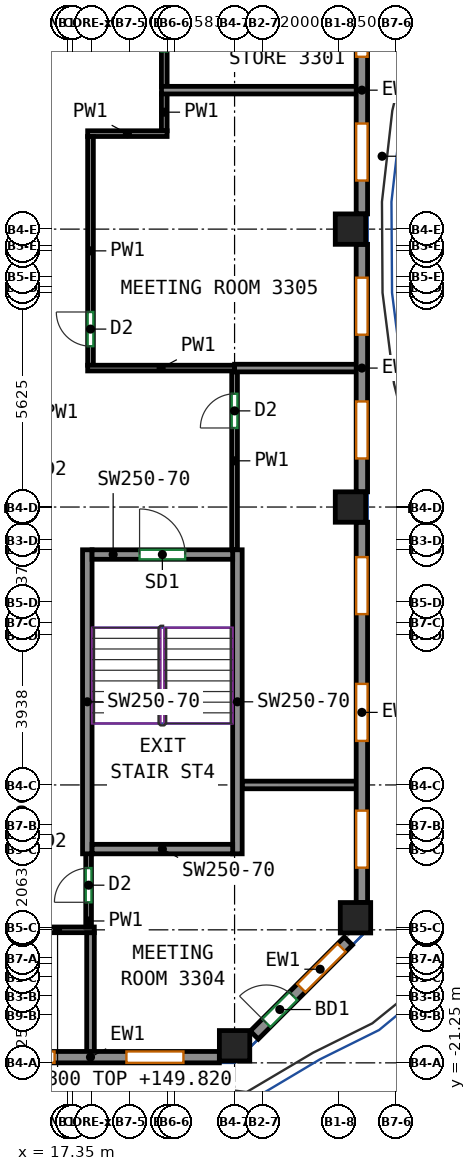
"""IFC4 building model, lengths in metres.
Left out: names, types, materials, properties, quantities, classifications, styles, units other than length and angle.
Written with IfcOpenShell. Run it as: python <this file> out.ifc"""

import sys

from ifc_helpers import new_model, si_unit, direction, frame, frame_2d, origin, origin_2d, place, context, subcontext, project, spatial, rectangle, extrude, source, transform, mapped, element, fill, save


model = new_model("IFC4")
c1 = context("Model", 3, precision=1e-05, world=origin(), true_north=direction((0.0, 1.0)))
c2 = subcontext(c1, "Body", "Model", "MODEL_VIEW")
j1 = project(units=[si_unit("LENGTHUNIT", "METRE"), si_unit("PLANEANGLEUNIT", "RADIAN")], contexts=[c1])
p1 = place(None, origin())
s1 = spatial("IfcSite", under=j1, at=p1, CompositionType="ELEMENT")
p2 = place(p1, origin())
s2 = spatial("IfcBuilding", under=s1, at=p2, CompositionType="ELEMENT")
p3 = place(p2, frame((0.0, 0.0, 147.3)))
s3 = spatial("IfcBuildingStorey", under=s2, at=p3, CompositionType="ELEMENT", Elevation=147.3)
m1 = source(origin(), c2, "Body", "SweptSolid", [
    extrude(rectangle(XDim=0.8, YDim=0.8, at=origin_2d()), origin(), (0.0, 0.0, 1.0), 3.12),
])
for number, where, z_axis, x_axis in (
    (1, (21.75, -20.8, 0.0), (0.0, 0.0, 1.0), (1.0, 0.0, 0.0)),
    (2, (24.8, -6.625, 0.0), (0.0, 0.0, 1.0), (1.0, 0.0, 0.0)),
    (3, (24.8, 0.688, 0.0), (0.0, 0.0, 1.0), (1.0, 0.0, 0.0)),
    (4, (24.932, -17.432, 0.0), (0.0, 0.0, 1.0), (1.0, 0.0, 0.0)),
):
    element("IfcColumn", number, at=place(p3, frame(where, z_axis=z_axis, x_axis=x_axis)), inside=s3, PredefinedType="COLUMN", context=c2, shape_type="MappedRepresentation", body=[
        mapped(m1, transform((0.0, 0.0, 0.0))),
    ])
m2 = source(origin(), c2, "Body", "SweptSolid", [
    extrude(rectangle(XDim=8.0, YDim=0.25, at=frame_2d((4.0, 0.0))), origin(), (0.0, 0.0, 1.0), 3.12),
])
for number, where, z_axis, x_axis in (
    (5, (17.875, -15.75, 0.0), (0.0, 0.0, 1.0), (0.0, 1.0, 0.0)),
    (6, (21.825, -15.75, 0.0), (0.0, 0.0, 1.0), (0.0, 1.0, 0.0)),
):
    element("IfcWall", number, at=place(p3, frame(where, z_axis=z_axis, x_axis=x_axis)), inside=s3, PredefinedType="SHEAR", context=c2, shape_type="MappedRepresentation", body=[
        mapped(m2, transform((0.0, 0.0, 0.0))),
    ])
m3 = source(origin(), c2, "Body", "SweptSolid", [
    extrude(rectangle(XDim=3.7, YDim=0.25, at=frame_2d((1.85, 0.0))), origin(), (0.0, 0.0, 1.0), 3.12),
])
p4 = place(p3, frame((18.0, -15.625, 0.0), z_axis=(0.0, 0.0, 1.0), x_axis=(1.0, 0.0, 0.0)))
e7 = element("IfcWall", 7, at=p4, inside=s3, PredefinedType="SHEAR", context=c2, shape_type="MappedRepresentation", body=[
    mapped(m3, transform((0.0, 0.0, 0.0))),
])
p5 = place(p3, frame((18.0, -7.875, 0.0), z_axis=(0.0, 0.0, 1.0), x_axis=(1.0, 0.0, 0.0)))
e8 = element("IfcWall", 8, at=p5, inside=s3, PredefinedType="SHEAR", context=c2, shape_type="MappedRepresentation", body=[
    mapped(m3, transform((0.0, 0.0, 0.0))),
])
p6 = place(p5, frame((1.25, 0.0, 0.0)))
e9 = element("IfcOpeningElement", 9, at=p6, cuts=e8, PredefinedType="OPENING", context=c2, shape_type="SweptSolid", body=[
    extrude(rectangle(XDim=1.2, YDim=2.1, at=frame_2d((0.6, 1.05))), frame((0.0, 0.135, 0.0), z_axis=(0.0, -1.0, 0.0), x_axis=(1.0, 0.0, 0.0)), (0.0, 0.0, 1.0), 0.27),
])
m4 = source(origin(), c2, "Body", "SweptSolid", [
    extrude(rectangle(XDim=6.783, YDim=0.3, at=frame_2d((3.392, 0.0))), origin(), (0.0, 0.0, 1.0), 3.12),
])
p7 = place(p3, frame((14.567, -21.1, 0.0), z_axis=(0.0, 0.0, 1.0), x_axis=(1.0, 0.0, 0.0)))
e10 = element("IfcWall", 10, at=p7, inside=s3, PredefinedType="SOLIDWALL", context=c2, shape_type="MappedRepresentation", body=[
    mapped(m4, transform((0.0, 0.0, 0.0))),
])
p8 = place(p7, frame((0.946, 0.0, 0.85)))
e11 = element("IfcOpeningElement", 11, at=p8, cuts=e10, PredefinedType="OPENING", context=c2, shape_type="SweptSolid", body=[
    extrude(rectangle(XDim=1.5, YDim=1.95, at=frame_2d((0.75, 0.975))), frame((0.0, 0.16, 0.0), z_axis=(0.0, -1.0, 0.0), x_axis=(1.0, 0.0, 0.0)), (0.0, 0.0, 1.0), 0.32),
])
p9 = place(p7, frame((4.337, 0.0, 0.85)))
e12 = element("IfcOpeningElement", 12, at=p9, cuts=e10, PredefinedType="OPENING", context=c2, shape_type="SweptSolid", body=[
    extrude(rectangle(XDim=1.5, YDim=1.95, at=frame_2d((0.75, 0.975))), frame((0.0, 0.16, 0.0), z_axis=(0.0, -1.0, 0.0), x_axis=(1.0, 0.0, 0.0)), (0.0, 0.0, 1.0), 0.32),
])
m5 = source(origin(), c2, "Body", "SweptSolid", [
    extrude(rectangle(XDim=3.5, YDim=0.3, at=frame_2d((1.75, 0.0))), origin(), (0.0, 0.0, 1.0), 3.12),
])
p10 = place(p3, frame((22.269, -20.519, 0.0), z_axis=(0.0, 0.0, 1.0), x_axis=(0.707141656123, 0.70707190453, 0.0)))
e13 = element("IfcWall", 13, at=p10, inside=s3, PredefinedType="SOLIDWALL", context=c2, shape_type="MappedRepresentation", body=[
    mapped(m5, transform((0.0, 0.0, 0.0))),
])
p11 = place(p10, frame((1.75, 0.0, 0.85)))
e14 = element("IfcOpeningElement", 14, at=p11, cuts=e13, PredefinedType="OPENING", context=c2, shape_type="SweptSolid", body=[
    extrude(rectangle(XDim=1.5, YDim=1.95, at=frame_2d((0.75, 0.975))), frame((0.0, 0.16, 0.0), z_axis=(0.0, -1.0, 0.0), x_axis=(1.0, 0.0, 0.0)), (0.0, 0.0, 1.0), 0.32),
])
p12 = place(p10, frame((0.45, 0.0, 0.0)))
e15 = element("IfcOpeningElement", 15, at=p12, cuts=e13, PredefinedType="OPENING", context=c2, shape_type="SweptSolid", body=[
    extrude(rectangle(XDim=1.0, YDim=2.1, at=frame_2d((0.5, 1.05))), frame((0.0, 0.16, 0.0), z_axis=(0.0, -1.0, 0.0), x_axis=(1.0, 0.0, 0.0)), (0.0, 0.0, 1.0), 0.32),
])
m6 = source(origin(), c2, "Body", "SweptSolid", [
    extrude(rectangle(XDim=10.007, YDim=0.3, at=frame_2d((5.003, 0.0))), origin(), (0.0, 0.0, 1.0), 3.12),
])
p13 = place(p3, frame((25.1, -17.032, 0.0), z_axis=(0.0, 0.0, 1.0), x_axis=(0.0, 1.0, 0.0)))
e16 = element("IfcWall", 16, at=p13, inside=s3, PredefinedType="SOLIDWALL", context=c2, shape_type="MappedRepresentation", body=[
    mapped(m6, transform((0.0, 0.0, 0.0))),
])
p14 = place(p13, frame((0.918, 0.0, 0.85)))
e17 = element("IfcOpeningElement", 17, at=p14, cuts=e16, PredefinedType="OPENING", context=c2, shape_type="SweptSolid", body=[
    extrude(rectangle(XDim=1.5, YDim=1.95, at=frame_2d((0.75, 0.975))), frame((0.0, 0.16, 0.0), z_axis=(0.0, -1.0, 0.0), x_axis=(1.0, 0.0, 0.0)), (0.0, 0.0, 1.0), 0.32),
])
p15 = place(p13, frame((4.253, 0.0, 0.85)))
e18 = element("IfcOpeningElement", 18, at=p15, cuts=e16, PredefinedType="OPENING", context=c2, shape_type="SweptSolid", body=[
    extrude(rectangle(XDim=1.5, YDim=1.95, at=frame_2d((0.75, 0.975))), frame((0.0, 0.16, 0.0), z_axis=(0.0, -1.0, 0.0), x_axis=(1.0, 0.0, 0.0)), (0.0, 0.0, 1.0), 0.32),
])
p16 = place(p13, frame((7.589, 0.0, 0.85)))
e19 = element("IfcOpeningElement", 19, at=p16, cuts=e16, PredefinedType="OPENING", context=c2, shape_type="SweptSolid", body=[
    extrude(rectangle(XDim=1.5, YDim=1.95, at=frame_2d((0.75, 0.975))), frame((0.0, 0.16, 0.0), z_axis=(0.0, -1.0, 0.0), x_axis=(1.0, 0.0, 0.0)), (0.0, 0.0, 1.0), 0.32),
])
m7 = source(origin(), c2, "Body", "SweptSolid", [
    extrude(rectangle(XDim=6.513, YDim=0.3, at=frame_2d((3.256, 0.0))), origin(), (0.0, 0.0, 1.0), 3.12),
])
p17 = place(p3, frame((25.1, -6.225, 0.0), z_axis=(0.0, 0.0, 1.0), x_axis=(0.0, 1.0, 0.0)))
e20 = element("IfcWall", 20, at=p17, inside=s3, PredefinedType="SOLIDWALL", context=c2, shape_type="MappedRepresentation", body=[
    mapped(m7, transform((0.0, 0.0, 0.0))),
])
p18 = place(p17, frame((0.878, 0.0, 0.85)))
e21 = element("IfcOpeningElement", 21, at=p18, cuts=e20, PredefinedType="OPENING", context=c2, shape_type="SweptSolid", body=[
    extrude(rectangle(XDim=1.5, YDim=1.95, at=frame_2d((0.75, 0.975))), frame((0.0, 0.16, 0.0), z_axis=(0.0, -1.0, 0.0), x_axis=(1.0, 0.0, 0.0)), (0.0, 0.0, 1.0), 0.32),
])
p19 = place(p17, frame((4.135, 0.0, 0.85)))
e22 = element("IfcOpeningElement", 22, at=p19, cuts=e20, PredefinedType="OPENING", context=c2, shape_type="SweptSolid", body=[
    extrude(rectangle(XDim=1.5, YDim=1.95, at=frame_2d((0.75, 0.975))), frame((0.0, 0.16, 0.0), z_axis=(0.0, -1.0, 0.0), x_axis=(1.0, 0.0, 0.0)), (0.0, 0.0, 1.0), 0.32),
])
p20 = place(p3, frame((25.1, 1.087, 0.0), z_axis=(0.0, 0.0, 1.0), x_axis=(0.0, 1.0, 0.0)))
e23 = element("IfcWall", 23, at=p20, inside=s3, PredefinedType="SOLIDWALL", context=c2, shape_type="MappedRepresentation", body=[
    mapped(m7, transform((0.0, 0.0, 0.0))),
])
p21 = place(p20, frame((0.878, 0.0, 0.85)))
e24 = element("IfcOpeningElement", 24, at=p21, cuts=e23, PredefinedType="OPENING", context=c2, shape_type="SweptSolid", body=[
    extrude(rectangle(XDim=1.5, YDim=1.95, at=frame_2d((0.75, 0.975))), frame((0.0, 0.16, 0.0), z_axis=(0.0, -1.0, 0.0), x_axis=(1.0, 0.0, 0.0)), (0.0, 0.0, 1.0), 0.32),
])
p22 = place(p20, frame((4.135, 0.0, 0.85)))
e25 = element("IfcOpeningElement", 25, at=p22, cuts=e23, PredefinedType="OPENING", context=c2, shape_type="SweptSolid", body=[
    extrude(rectangle(XDim=1.5, YDim=1.95, at=frame_2d((0.75, 0.975))), frame((0.0, 0.16, 0.0), z_axis=(0.0, -1.0, 0.0), x_axis=(1.0, 0.0, 0.0)), (0.0, 0.0, 1.0), 0.32),
])
p23 = place(p3, frame((16.125, -17.75, 0.0), z_axis=(0.0, 0.0, 1.0), x_axis=(1.0, 0.0, 0.0)))
e26 = element("IfcWall", 26, at=p23, inside=s3, PredefinedType="PARTITIONING", context=c2, shape_type="SweptSolid", body=[
    extrude(rectangle(XDim=1.934, YDim=0.15, at=frame_2d((0.967, 0.0))), origin(), (0.0, 0.0, 1.0), 2.52),
])
p24 = place(p3, frame((17.909, -17.675, 0.0), z_axis=(0.0, 0.0, 1.0), x_axis=(0.0, 1.0, 0.0)))
e27 = element("IfcWall", 27, at=p24, inside=s3, PredefinedType="PARTITIONING", context=c2, shape_type="SweptSolid", body=[
    extrude(rectangle(XDim=1.975, YDim=0.15, at=frame_2d((0.988, 0.0))), origin(), (0.0, 0.0, 1.0), 3.12),
])
p25 = place(p24, frame((0.65, 0.0, 0.0)))
e28 = element("IfcOpeningElement", 28, at=p25, cuts=e27, PredefinedType="OPENING", context=c2, shape_type="SweptSolid", body=[
    extrude(rectangle(XDim=0.9, YDim=2.1, at=frame_2d((0.45, 1.05))), frame((0.0, 0.085, 0.0), z_axis=(0.0, -1.0, 0.0), x_axis=(1.0, 0.0, 0.0)), (0.0, 0.0, 1.0), 0.17),
])
p26 = place(p3, frame((19.9, 4.434, 0.0), z_axis=(0.0, 0.0, 1.0), x_axis=(0.0, 1.0, 0.0)))
e29 = element("IfcWall", 29, at=p26, inside=s3, PredefinedType="PARTITIONING", context=c2, shape_type="SweptSolid", body=[
    extrude(rectangle(XDim=3.476, YDim=0.15, at=frame_2d((1.738, 0.0))), origin(), (0.0, 0.0, 1.0), 3.12),
])
p27 = place(p26, frame((0.927, 0.0, 0.0)))
e30 = element("IfcOpeningElement", 30, at=p27, cuts=e29, PredefinedType="OPENING", context=c2, shape_type="SweptSolid", body=[
    extrude(rectangle(XDim=1.0, YDim=2.1, at=frame_2d((0.5, 1.05))), frame((0.0, 0.085, 0.0), z_axis=(0.0, -1.0, 0.0), x_axis=(1.0, 0.0, 0.0)), (0.0, 0.0, 1.0), 0.17),
])
p28 = place(p3, frame((19.9, 3.275, 0.0), z_axis=(0.0, 0.0, 1.0), x_axis=(0.0, 1.0, 0.0)))
e31 = element("IfcWall", 31, at=p28, inside=s3, PredefinedType="PARTITIONING", context=c2, shape_type="SweptSolid", body=[
    extrude(rectangle(XDim=0.979, YDim=0.15, at=frame_2d((0.49, 0.0))), origin(), (0.0, 0.0, 1.0), 3.12),
])
p29 = place(p3, frame((17.884, 3.2, 0.0), z_axis=(0.0, 0.0, 1.0), x_axis=(1.0, 0.0, 0.0)))
e32 = element("IfcWall", 32, at=p29, inside=s3, PredefinedType="PARTITIONING", context=c2, shape_type="SweptSolid", body=[
    extrude(rectangle(XDim=2.091, YDim=0.15, at=frame_2d((1.045, 0.0))), origin(), (0.0, 0.0, 1.0), 3.12),
])
p30 = place(p3, frame((17.959, -2.894, 0.0), z_axis=(0.0, 0.0, 1.0), x_axis=(0.0, 1.0, 0.0)))
e33 = element("IfcWall", 33, at=p30, inside=s3, PredefinedType="PARTITIONING", context=c2, shape_type="SweptSolid", body=[
    extrude(rectangle(XDim=6.019, YDim=0.15, at=frame_2d((3.01, 0.0))), origin(), (0.0, 0.0, 1.0), 3.12),
])
p31 = place(p30, frame((0.501, 0.0, 0.0)))
e34 = element("IfcOpeningElement", 34, at=p31, cuts=e33, PredefinedType="OPENING", context=c2, shape_type="SweptSolid", body=[
    extrude(rectangle(XDim=0.9, YDim=2.1, at=frame_2d((0.45, 1.05))), frame((0.0, 0.085, 0.0), z_axis=(0.0, -1.0, 0.0), x_axis=(1.0, 0.0, 0.0)), (0.0, 0.0, 1.0), 0.17),
])
p32 = place(p3, frame((21.751, -2.969, 0.0), z_axis=(0.0, 0.0, 1.0), x_axis=(-1.0, 0.0, 0.0)))
e35 = element("IfcWall", 35, at=p32, inside=s3, PredefinedType="PARTITIONING", context=c2, shape_type="SweptSolid", body=[
    extrude(rectangle(XDim=3.867, YDim=0.15, at=frame_2d((1.934, 0.0))), origin(), (0.0, 0.0, 1.0), 3.12),
])
p33 = place(p3, frame((21.75, -7.75, 0.0), z_axis=(0.0, 0.0, 1.0), x_axis=(0.0, 1.0, 0.0)))
e36 = element("IfcWall", 36, at=p33, inside=s3, PredefinedType="PARTITIONING", context=c2, shape_type="SweptSolid", body=[
    extrude(rectangle(XDim=4.682, YDim=0.15, at=frame_2d((2.341, 0.0))), origin(), (0.0, 0.0, 1.0), 3.12),
])
p34 = place(p33, frame((3.205, 0.0, 0.0)))
e37 = element("IfcOpeningElement", 37, at=p34, cuts=e36, PredefinedType="OPENING", context=c2, shape_type="SweptSolid", body=[
    extrude(rectangle(XDim=0.9, YDim=2.1, at=frame_2d((0.45, 1.05))), frame((0.0, 0.085, 0.0), z_axis=(0.0, -1.0, 0.0), x_axis=(1.0, 0.0, 0.0)), (0.0, 0.0, 1.0), 0.17),
])
p35 = place(p3, frame((17.959, -21.0, 0.0), z_axis=(0.0, 0.0, 1.0), x_axis=(0.0, 1.0, 0.0)))
e38 = element("IfcWall", 38, at=p35, inside=s3, PredefinedType="PARTITIONING", context=c2, shape_type="SweptSolid", body=[
    extrude(rectangle(XDim=3.173, YDim=0.2, at=frame_2d((1.586, 0.0))), origin(), (0.0, 0.0, 1.0), 3.12),
])
p36 = place(p3, frame((25.0, -13.938, 0.0), z_axis=(0.0, 0.0, 1.0), x_axis=(-1.0, 0.0, 0.0)))
e39 = element("IfcWall", 39, at=p36, inside=s3, PredefinedType="PARTITIONING", context=c2, shape_type="SweptSolid", body=[
    extrude(rectangle(XDim=3.05, YDim=0.2, at=frame_2d((1.525, 0.0))), origin(), (0.0, 0.0, 1.0), 3.12),
])
p37 = place(p3, frame((19.827, 4.344, 0.0), z_axis=(0.0, 0.0, 1.0), x_axis=(1.0, 0.0, 0.0)))
e40 = element("IfcWall", 40, at=p37, inside=s3, PredefinedType="PARTITIONING", context=c2, shape_type="SweptSolid", body=[
    extrude(rectangle(XDim=5.173, YDim=0.2, at=frame_2d((2.586, 0.0))), origin(), (0.0, 0.0, 1.0), 3.12),
])
p38 = place(p3, frame((21.751, -2.968, 0.0), z_axis=(0.0, 0.0, 1.0), x_axis=(0.999999954829, -0.000300571071, 0.0)))
e41 = element("IfcWall", 41, at=p38, inside=s3, PredefinedType="PARTITIONING", context=c2, shape_type="SweptSolid", body=[
    extrude(rectangle(XDim=3.249, YDim=0.2, at=frame_2d((1.625, 0.0))), origin(), (0.0, 0.0, 1.0), 3.12),
])
p39 = place(p8, origin())
e42 = element("IfcWindow", 42, at=p39, inside=s3, PartitioningType="SINGLE_PANEL", PredefinedType="WINDOW", context=c2, shape_type="SweptSolid", body=[
    extrude(rectangle(XDim=1.5, YDim=1.95, at=frame_2d((0.75, 0.975))), frame((0.0, 0.03, 0.0), z_axis=(0.0, -1.0, 0.0), x_axis=(1.0, 0.0, 0.0)), (0.0, 0.0, 1.0), 0.06),
])
fill(e11, e42)
p40 = place(p9, origin())
e43 = element("IfcWindow", 43, at=p40, inside=s3, PartitioningType="SINGLE_PANEL", PredefinedType="WINDOW", context=c2, shape_type="SweptSolid", body=[
    extrude(rectangle(XDim=1.5, YDim=1.95, at=frame_2d((0.75, 0.975))), frame((0.0, 0.03, 0.0), z_axis=(0.0, -1.0, 0.0), x_axis=(1.0, 0.0, 0.0)), (0.0, 0.0, 1.0), 0.06),
])
fill(e12, e43)
p41 = place(p11, origin())
e44 = element("IfcWindow", 44, at=p41, inside=s3, PartitioningType="SINGLE_PANEL", PredefinedType="WINDOW", context=c2, shape_type="SweptSolid", body=[
    extrude(rectangle(XDim=1.5, YDim=1.95, at=frame_2d((0.75, 0.975))), frame((0.0, 0.03, 0.0), z_axis=(0.0, -1.0, 0.0), x_axis=(1.0, 0.0, 0.0)), (0.0, 0.0, 1.0), 0.06),
])
fill(e14, e44)
p42 = place(p12, origin())
e45 = element("IfcDoor", 45, at=p42, inside=s3, OperationType="SINGLE_SWING_LEFT", PredefinedType="DOOR", context=c2, shape_type="SweptSolid", body=[
    extrude(rectangle(XDim=1.0, YDim=2.1, at=frame_2d((0.5, 1.05))), frame((0.0, 0.025, 0.0), z_axis=(0.0, -1.0, 0.0), x_axis=(1.0, 0.0, 0.0)), (0.0, 0.0, 1.0), 0.05),
])
fill(e15, e45)
p43 = place(p14, origin())
e46 = element("IfcWindow", 46, at=p43, inside=s3, PartitioningType="SINGLE_PANEL", PredefinedType="WINDOW", context=c2, shape_type="SweptSolid", body=[
    extrude(rectangle(XDim=1.5, YDim=1.95, at=frame_2d((0.75, 0.975))), frame((0.0, 0.03, 0.0), z_axis=(0.0, -1.0, 0.0), x_axis=(1.0, 0.0, 0.0)), (0.0, 0.0, 1.0), 0.06),
])
fill(e17, e46)
p44 = place(p15, origin())
e47 = element("IfcWindow", 47, at=p44, inside=s3, PartitioningType="SINGLE_PANEL", PredefinedType="WINDOW", context=c2, shape_type="SweptSolid", body=[
    extrude(rectangle(XDim=1.5, YDim=1.95, at=frame_2d((0.75, 0.975))), frame((0.0, 0.03, 0.0), z_axis=(0.0, -1.0, 0.0), x_axis=(1.0, 0.0, 0.0)), (0.0, 0.0, 1.0), 0.06),
])
fill(e18, e47)
p45 = place(p16, origin())
e48 = element("IfcWindow", 48, at=p45, inside=s3, PartitioningType="SINGLE_PANEL", PredefinedType="WINDOW", context=c2, shape_type="SweptSolid", body=[
    extrude(rectangle(XDim=1.5, YDim=1.95, at=frame_2d((0.75, 0.975))), frame((0.0, 0.03, 0.0), z_axis=(0.0, -1.0, 0.0), x_axis=(1.0, 0.0, 0.0)), (0.0, 0.0, 1.0), 0.06),
])
fill(e19, e48)
p46 = place(p18, origin())
e49 = element("IfcWindow", 49, at=p46, inside=s3, PartitioningType="SINGLE_PANEL", PredefinedType="WINDOW", context=c2, shape_type="SweptSolid", body=[
    extrude(rectangle(XDim=1.5, YDim=1.95, at=frame_2d((0.75, 0.975))), frame((0.0, 0.03, 0.0), z_axis=(0.0, -1.0, 0.0), x_axis=(1.0, 0.0, 0.0)), (0.0, 0.0, 1.0), 0.06),
])
fill(e21, e49)
p47 = place(p19, origin())
e50 = element("IfcWindow", 50, at=p47, inside=s3, PartitioningType="SINGLE_PANEL", PredefinedType="WINDOW", context=c2, shape_type="SweptSolid", body=[
    extrude(rectangle(XDim=1.5, YDim=1.95, at=frame_2d((0.75, 0.975))), frame((0.0, 0.03, 0.0), z_axis=(0.0, -1.0, 0.0), x_axis=(1.0, 0.0, 0.0)), (0.0, 0.0, 1.0), 0.06),
])
fill(e22, e50)
p48 = place(p21, origin())
e51 = element("IfcWindow", 51, at=p48, inside=s3, PartitioningType="SINGLE_PANEL", PredefinedType="WINDOW", context=c2, shape_type="SweptSolid", body=[
    extrude(rectangle(XDim=1.5, YDim=1.95, at=frame_2d((0.75, 0.975))), frame((0.0, 0.03, 0.0), z_axis=(0.0, -1.0, 0.0), x_axis=(1.0, 0.0, 0.0)), (0.0, 0.0, 1.0), 0.06),
])
fill(e24, e51)
p49 = place(p22, origin())
e52 = element("IfcWindow", 52, at=p49, inside=s3, PartitioningType="SINGLE_PANEL", PredefinedType="WINDOW", context=c2, shape_type="SweptSolid", body=[
    extrude(rectangle(XDim=1.5, YDim=1.95, at=frame_2d((0.75, 0.975))), frame((0.0, 0.03, 0.0), z_axis=(0.0, -1.0, 0.0), x_axis=(1.0, 0.0, 0.0)), (0.0, 0.0, 1.0), 0.06),
])
fill(e25, e52)
p50 = place(p6, origin())
e53 = element("IfcDoor", 53, at=p50, inside=s3, OperationType="DOUBLE_DOOR_SINGLE_SWING", PredefinedType="DOOR", context=c2, shape_type="SweptSolid", body=[
    extrude(rectangle(XDim=1.2, YDim=2.1, at=frame_2d((0.6, 1.05))), frame((0.0, 0.025, 0.0), z_axis=(0.0, -1.0, 0.0), x_axis=(1.0, 0.0, 0.0)), (0.0, 0.0, 1.0), 0.05),
])
fill(e9, e53)
p51 = place(p25, origin())
e54 = element("IfcDoor", 54, at=p51, inside=s3, OperationType="SINGLE_SWING_LEFT", PredefinedType="DOOR", context=c2, shape_type="SweptSolid", body=[
    extrude(rectangle(XDim=0.9, YDim=2.1, at=frame_2d((0.45, 1.05))), frame((0.0, 0.025, 0.0), z_axis=(0.0, -1.0, 0.0), x_axis=(1.0, 0.0, 0.0)), (0.0, 0.0, 1.0), 0.05),
])
fill(e28, e54)
p52 = place(p34, origin())
e55 = element("IfcDoor", 55, at=p52, inside=s3, OperationType="SINGLE_SWING_LEFT", PredefinedType="DOOR", context=c2, shape_type="SweptSolid", body=[
    extrude(rectangle(XDim=0.9, YDim=2.1, at=frame_2d((0.45, 1.05))), frame((0.0, 0.025, 0.0), z_axis=(0.0, -1.0, 0.0), x_axis=(1.0, 0.0, 0.0)), (0.0, 0.0, 1.0), 0.05),
])
fill(e37, e55)
p53 = place(p31, origin())
e56 = element("IfcDoor", 56, at=p53, inside=s3, OperationType="SINGLE_SWING_RIGHT", PredefinedType="DOOR", context=c2, shape_type="SweptSolid", body=[
    extrude(rectangle(XDim=0.9, YDim=2.1, at=frame_2d((0.45, 1.05))), frame((0.0, 0.025, 0.0), z_axis=(0.0, -1.0, 0.0), x_axis=(1.0, 0.0, 0.0)), (0.0, 0.0, 1.0), 0.05),
])
fill(e34, e56)
save(model, sys.argv[1])
